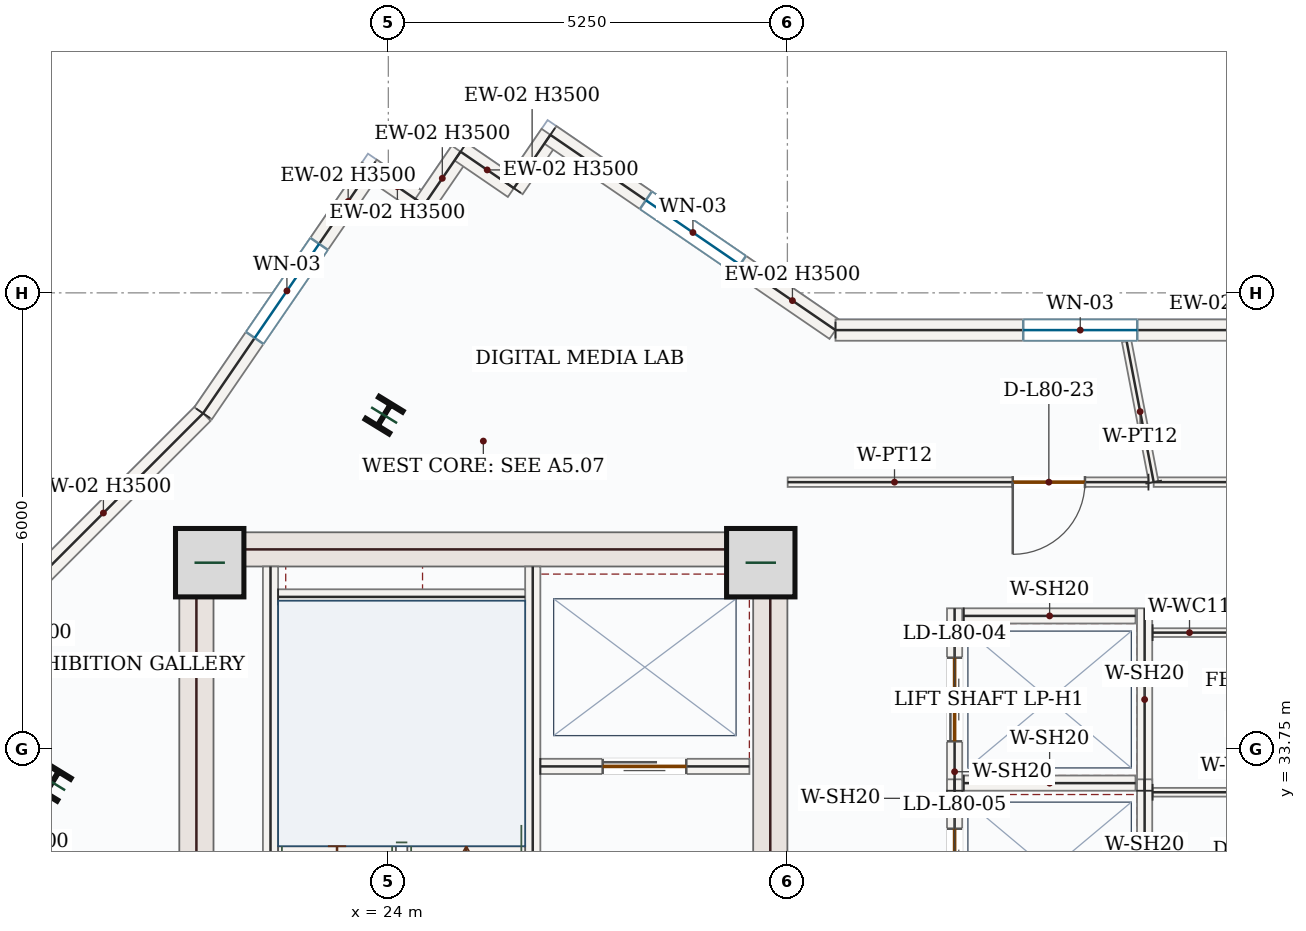
"""IFC4 building model, lengths in metres.
Left out: names, types, materials, properties, quantities, classifications, styles, units other than length and angle.
Written with IfcOpenShell. Run it as: python <this file> out.ifc"""

import sys

from ifc_helpers import new_model, si_unit, direction, frame, frame_2d, origin, origin_2d, place, context, subcontext, project, spatial, rectangle, i_section, extrude, source, transform, mapped, element, fill, save


model = new_model("IFC4")
c1 = context("Model", 3, precision=1e-05, world=origin(), true_north=direction((0.0, 1.0)))
c2 = subcontext(c1, "Body", "Model", "MODEL_VIEW")
j1 = project(units=[si_unit("LENGTHUNIT", "METRE"), si_unit("PLANEANGLEUNIT", "RADIAN")], contexts=[c1])
p1 = place(None, origin())
s1 = spatial("IfcSite", under=j1, at=p1, CompositionType="ELEMENT")
p2 = place(p1, origin())
s2 = spatial("IfcBuilding", under=s1, at=p2, CompositionType="ELEMENT")
p3 = place(p2, frame((0.0, 0.0, 331.05)))
s3 = spatial("IfcBuildingStorey", under=s2, at=p3, CompositionType="ELEMENT", Elevation=331.05)
m1 = source(origin(), c2, "Body", "SweptSolid", [
    extrude(rectangle(XDim=8.55, YDim=0.45, at=frame_2d((4.275, 0.0))), origin(), (0.0, 0.0, 1.0), 3.5),
])
p4 = place(p3, frame((21.475, 28.05, 0.0), z_axis=(0.0, 0.0, 1.0), x_axis=(0.0, 1.0, 0.0)))
e1 = element("IfcWall", 1, at=p4, inside=s3, PredefinedType="SHEAR", context=c2, shape_type="MappedRepresentation", body=[
    mapped(m1, transform((0.0, 0.0, 0.0), x_axis=(1.0, 0.0, 0.0), y_axis=(0.0, 1.0, 0.0), z_axis=(0.0, 0.0, 1.0), scale=1.0)),
])
p5 = place(p3, frame((29.025, 28.05, 0.0), z_axis=(0.0, 0.0, 1.0), x_axis=(0.0, 1.0, 0.0)))
e2 = element("IfcWall", 2, at=p5, inside=s3, PredefinedType="SHEAR", context=c2, shape_type="SweptSolid", body=[
    extrude(rectangle(XDim=8.55, YDim=0.45, at=frame_2d((4.275, 0.0))), origin(), (0.0, 0.0, 1.0), 3.5),
])
p6 = place(p5, frame((1.5, 0.0, 0.0)))
e3 = element("IfcOpeningElement", 3, at=p6, cuts=e2, PredefinedType="OPENING", context=c2, shape_type="SweptSolid", body=[
    extrude(rectangle(XDim=1.1, YDim=2.2, at=frame_2d((0.55, 1.1))), frame((0.0, 0.235, 0.0), z_axis=(0.0, -1.0, 0.0), x_axis=(1.0, 0.0, 0.0)), (0.0, 0.0, 1.0), 0.47),
])
m2 = source(origin(), c2, "Body", "SweptSolid", [
    extrude(rectangle(XDim=7.1, YDim=0.45, at=frame_2d((3.55, 0.0))), origin(), (0.0, 0.0, 1.0), 3.5),
])
p7 = place(p3, frame((21.7, 36.375, 0.0), z_axis=(0.0, 0.0, 1.0), x_axis=(1.0, 0.0, 0.0)))
e4 = element("IfcWall", 4, at=p7, inside=s3, PredefinedType="SHEAR", context=c2, shape_type="MappedRepresentation", body=[
    mapped(m2, transform((0.0, 0.0, 0.0), x_axis=(1.0, 0.0, 0.0), y_axis=(0.0, 1.0, 0.0), z_axis=(0.0, 0.0, 1.0), scale=1.0)),
])
m3 = source(origin(), c2, "Body", "SweptSolid", [
    extrude(rectangle(XDim=0.9, YDim=0.9, at=origin_2d()), origin(), (0.0, 0.0, 1.0), 3.75),
])
for number, where, z_axis, x_axis in (
    (5, (21.65, 36.2, 0.0), (0.0, 0.0, 1.0), (1.0, 0.0, 0.0)),
    (6, (28.9, 36.2, 0.0), (0.0, 0.0, 1.0), (1.0, 0.0, 0.0)),
):
    element("IfcColumn", number, at=place(p3, frame(where, z_axis=z_axis, x_axis=x_axis)), inside=s3, PredefinedType="COLUMN", context=c2, shape_type="MappedRepresentation", body=[
        mapped(m3, transform((0.0, 0.0, 0.0), x_axis=(1.0, 0.0, 0.0), y_axis=(0.0, 1.0, 0.0), z_axis=(0.0, 0.0, 1.0), scale=1.0)),
    ])
m4 = source(origin(), c2, "Body", "SweptSolid", [
    extrude(i_section(OverallWidth=0.369, OverallDepth=0.356, WebThickness=0.011, FlangeThickness=0.018, FilletRadius=0.018, at=origin_2d()), origin(), (0.0, 0.0, 1.0), 3.75),
])
for number, where, z_axis, x_axis in (
    (7, (23.945, 38.141, 0.0), (0.0, 0.0, 1.0), (-0.853, 0.522, 0.0)),
    (8, (19.577, 33.311, 0.0), (0.0, 0.0, 1.0), (-0.853, 0.522, 0.0)),
):
    element("IfcColumn", number, at=place(p3, frame(where, z_axis=z_axis, x_axis=x_axis)), inside=s3, PredefinedType="COLUMN", context=c2, shape_type="MappedRepresentation", body=[
        mapped(m4, transform((0.0, 0.0, 0.0), x_axis=(1.0, 0.0, 0.0), y_axis=(0.0, 1.0, 0.0), z_axis=(0.0, 0.0, 1.0), scale=1.0)),
    ])
m5 = source(origin(), c2, "Body", "SweptSolid", [
    extrude(rectangle(XDim=3.709, YDim=0.28, at=frame_2d((1.855, 0.0))), origin(), (0.0, 0.0, 1.0), 3.5),
])
p8 = place(p3, frame((18.94, 35.542, 0.0), z_axis=(0.0, 0.0, 1.0), x_axis=(0.707106781187, 0.707106781187, 0.0)))
e9 = element("IfcWall", 9, at=p8, inside=s3, PredefinedType="SOLIDWALL", context=c2, shape_type="MappedRepresentation", body=[
    mapped(m5, transform((0.0, 0.0, 0.0), x_axis=(1.0, 0.0, 0.0), y_axis=(0.0, 1.0, 0.0), z_axis=(0.0, 0.0, 1.0), scale=1.0)),
])
p9 = place(p3, frame((21.563, 38.165, 0.0), z_axis=(0.0, 0.0, 1.0), x_axis=(0.564961879511, 0.825117006672, 0.0)))
e10 = element("IfcWall", 10, at=p9, inside=s3, PredefinedType="SOLIDWALL", context=c2, shape_type="SweptSolid", body=[
    extrude(rectangle(XDim=3.904, YDim=0.28, at=frame_2d((1.952, 0.0))), origin(), (0.0, 0.0, 1.0), 3.5),
])
p10 = place(p9, frame((1.202, 0.0, 0.85)))
e11 = element("IfcOpeningElement", 11, at=p10, cuts=e10, PredefinedType="OPENING", context=c2, shape_type="SweptSolid", body=[
    extrude(rectangle(XDim=1.5, YDim=1.5, at=frame_2d((0.75, 0.75))), frame((0.0, 0.15, 0.0), z_axis=(0.0, -1.0, 0.0), x_axis=(1.0, 0.0, 0.0)), (0.0, 0.0, 1.0), 0.3),
])
m6 = source(origin(), c2, "Body", "SweptSolid", [
    extrude(rectangle(XDim=0.85, YDim=0.28, at=frame_2d((0.425, 0.0))), origin(), (0.0, 0.0, 1.0), 3.5),
])
for number, where, z_axis, x_axis in (
    (12, (23.769, 41.386, 0.0), (0.0, 0.0, 1.0), (0.825, -0.565, 0.0)),
    (13, (24.47, 40.906, 0.0), (0.0, 0.0, 1.0), (0.565, 0.825, 0.0)),
    (14, (24.95, 41.607, 0.0), (0.0, 0.0, 1.0), (0.825, -0.565, 0.0)),
    (15, (25.652, 41.127, 0.0), (0.0, 0.0, 1.0), (0.565, 0.825, 0.0)),
):
    element("IfcWall", number, at=place(p3, frame(where, z_axis=z_axis, x_axis=x_axis)), inside=s3, PredefinedType="SOLIDWALL", context=c2, shape_type="MappedRepresentation", body=[
        mapped(m6, transform((0.0, 0.0, 0.0), x_axis=(1.0, 0.0, 0.0), y_axis=(0.0, 1.0, 0.0), z_axis=(0.0, 0.0, 1.0), scale=1.0)),
    ])
p11 = place(p3, frame((26.132, 41.829, 0.0), z_axis=(0.0, 0.0, 1.0), x_axis=(0.825104362901, -0.564980345075, 0.0)))
e16 = element("IfcWall", 16, at=p11, inside=s3, PredefinedType="SOLIDWALL", context=c2, shape_type="SweptSolid", body=[
    extrude(rectangle(XDim=4.546, YDim=0.28, at=frame_2d((2.273, 0.0))), origin(), (0.0, 0.0, 1.0), 3.5),
])
p12 = place(p11, frame((1.523, 0.0, 0.85)))
e17 = element("IfcOpeningElement", 17, at=p12, cuts=e16, PredefinedType="OPENING", context=c2, shape_type="SweptSolid", body=[
    extrude(rectangle(XDim=1.5, YDim=1.5, at=frame_2d((0.75, 0.75))), frame((0.0, 0.15, 0.0), z_axis=(0.0, -1.0, 0.0), x_axis=(1.0, 0.0, 0.0)), (0.0, 0.0, 1.0), 0.3),
])
p13 = place(p3, frame((29.883, 39.26, 0.0), z_axis=(0.0, 0.0, 1.0), x_axis=(1.0, 0.0, 0.0)))
e18 = element("IfcWall", 18, at=p13, inside=s3, PredefinedType="SOLIDWALL", context=c2, shape_type="SweptSolid", body=[
    extrude(rectangle(XDim=6.44, YDim=0.28, at=frame_2d((3.22, 0.0))), origin(), (0.0, 0.0, 1.0), 3.5),
])
p14 = place(p13, frame((2.47, 0.0, 0.85)))
e19 = element("IfcOpeningElement", 19, at=p14, cuts=e18, PredefinedType="OPENING", context=c2, shape_type="SweptSolid", body=[
    extrude(rectangle(XDim=1.5, YDim=1.5, at=frame_2d((0.75, 0.75))), frame((0.0, 0.15, 0.0), z_axis=(0.0, -1.0, 0.0), x_axis=(1.0, 0.0, 0.0)), (0.0, 0.0, 1.0), 0.3),
])
m7 = source(origin(), c2, "Body", "SweptSolid", [
    extrude(rectangle(XDim=7.87, YDim=0.2, at=frame_2d((3.935, 0.0))), origin(), (0.0, 0.0, 1.0), 3.5),
])
p15 = place(p3, frame((22.45, 28.28, 0.0), z_axis=(0.0, 0.0, 1.0), x_axis=(0.0, 1.0, 0.0)))
e20 = element("IfcWall", 20, at=p15, inside=s3, PredefinedType="SOLIDWALL", context=c2, shape_type="MappedRepresentation", body=[
    mapped(m7, transform((0.0, 0.0, 0.0), x_axis=(1.0, 0.0, 0.0), y_axis=(0.0, 1.0, 0.0), z_axis=(0.0, 0.0, 1.0), scale=1.0)),
])
p16 = place(p3, frame((25.9, 28.15, 0.0), z_axis=(0.0, 0.0, 1.0), x_axis=(0.0, 1.0, 0.0)))
e21 = element("IfcWall", 21, at=p16, inside=s3, PredefinedType="SOLIDWALL", context=c2, shape_type="SweptSolid", body=[
    extrude(rectangle(XDim=8.0, YDim=0.2, at=frame_2d((4.0, 0.0))), origin(), (0.0, 0.0, 1.0), 3.5),
])
p17 = place(p16, frame((0.4, 0.0, 0.0)))
e22 = element("IfcOpeningElement", 22, at=p17, cuts=e21, PredefinedType="OPENING", context=c2, shape_type="SweptSolid", body=[
    extrude(rectangle(XDim=1.05, YDim=2.15, at=frame_2d((0.525, 1.075))), frame((0.0, 0.11, 0.0), z_axis=(0.0, -1.0, 0.0), x_axis=(1.0, 0.0, 0.0)), (0.0, 0.0, 1.0), 0.22),
])
m8 = source(origin(), c2, "Body", "SweptSolid", [
    extrude(rectangle(XDim=3.25, YDim=0.2, at=frame_2d((1.625, 0.0))), origin(), (0.0, 0.0, 1.0), 3.5),
])
p18 = place(p3, frame((22.55, 35.75, 0.0), z_axis=(0.0, 0.0, 1.0), x_axis=(1.0, 0.0, 0.0)))
e23 = element("IfcWall", 23, at=p18, inside=s3, PredefinedType="SOLIDWALL", context=c2, shape_type="MappedRepresentation", body=[
    mapped(m8, transform((0.0, 0.0, 0.0), x_axis=(1.0, 0.0, 0.0), y_axis=(0.0, 1.0, 0.0), z_axis=(0.0, 0.0, 1.0), scale=1.0)),
])
p19 = place(p3, frame((26.0, 33.52, 0.0), z_axis=(0.0, 0.0, 1.0), x_axis=(1.0, 0.0, 0.0)))
e24 = element("IfcWall", 24, at=p19, inside=s3, PredefinedType="SOLIDWALL", context=c2, shape_type="SweptSolid", body=[
    extrude(rectangle(XDim=2.75, YDim=0.2, at=frame_2d((1.375, 0.0))), origin(), (0.0, 0.0, 1.0), 3.5),
])
p20 = place(p19, frame((0.82, 0.0, 0.0)))
e25 = element("IfcOpeningElement", 25, at=p20, cuts=e24, PredefinedType="OPENING", context=c2, shape_type="SweptSolid", body=[
    extrude(rectangle(XDim=1.1, YDim=2.15, at=frame_2d((0.55, 1.075))), frame((0.0, 0.11, 0.0), z_axis=(0.0, -1.0, 0.0), x_axis=(1.0, 0.0, 0.0)), (0.0, 0.0, 1.0), 0.22),
])
p21 = place(p3, frame((31.45, 33.2, 0.0), z_axis=(0.0, 0.0, 1.0), x_axis=(0.0, 1.0, 0.0)))
e26 = element("IfcWall", 26, at=p21, inside=s3, PredefinedType="SOLIDWALL", context=c2, shape_type="SweptSolid", body=[
    extrude(rectangle(XDim=2.4, YDim=0.2, at=frame_2d((1.2, 0.0))), origin(), (0.0, 0.0, 1.0), 3.5),
])
p22 = place(p21, frame((0.65, 0.0, 0.0)))
e27 = element("IfcOpeningElement", 27, at=p22, cuts=e26, PredefinedType="OPENING", context=c2, shape_type="SweptSolid", body=[
    extrude(rectangle(XDim=1.1, YDim=2.15, at=frame_2d((0.55, 1.075))), frame((0.0, 0.11, 0.0), z_axis=(0.0, -1.0, 0.0), x_axis=(1.0, 0.0, 0.0)), (0.0, 0.0, 1.0), 0.22),
])
m9 = source(origin(), c2, "Body", "SweptSolid", [
    extrude(rectangle(XDim=2.4, YDim=0.2, at=frame_2d((1.2, 0.0))), origin(), (0.0, 0.0, 1.0), 3.5),
])
p23 = place(p3, frame((33.95, 33.2, 0.0), z_axis=(0.0, 0.0, 1.0), x_axis=(0.0, 1.0, 0.0)))
e28 = element("IfcWall", 28, at=p23, inside=s3, PredefinedType="SOLIDWALL", context=c2, shape_type="MappedRepresentation", body=[
    mapped(m9, transform((0.0, 0.0, 0.0), x_axis=(1.0, 0.0, 0.0), y_axis=(0.0, 1.0, 0.0), z_axis=(0.0, 0.0, 1.0), scale=1.0)),
])
m10 = source(origin(), c2, "Body", "SweptSolid", [
    extrude(rectangle(XDim=2.26, YDim=0.2, at=frame_2d((1.13, 0.0))), origin(), (0.0, 0.0, 1.0), 3.5),
])
for number, where, z_axis, x_axis in (
    (29, (31.57, 33.3, 0.0), (0.0, 0.0, 1.0), (1.0, 0.0, 0.0)),
    (30, (31.57, 35.5, 0.0), (0.0, 0.0, 1.0), (1.0, 0.0, 0.0)),
):
    element("IfcWall", number, at=place(p3, frame(where, z_axis=z_axis, x_axis=x_axis)), inside=s3, PredefinedType="SOLIDWALL", context=c2, shape_type="MappedRepresentation", body=[
        mapped(m10, transform((0.0, 0.0, 0.0), x_axis=(1.0, 0.0, 0.0), y_axis=(0.0, 1.0, 0.0), z_axis=(0.0, 0.0, 1.0), scale=1.0)),
    ])
p24 = place(p3, frame((31.45, 30.95, 0.0), z_axis=(0.0, 0.0, 1.0), x_axis=(0.0, 1.0, 0.0)))
e31 = element("IfcWall", 31, at=p24, inside=s3, PredefinedType="SOLIDWALL", context=c2, shape_type="SweptSolid", body=[
    extrude(rectangle(XDim=2.4, YDim=0.2, at=frame_2d((1.2, 0.0))), origin(), (0.0, 0.0, 1.0), 3.5),
])
p25 = place(p24, frame((0.65, 0.0, 0.0)))
e32 = element("IfcOpeningElement", 32, at=p25, cuts=e31, PredefinedType="OPENING", context=c2, shape_type="SweptSolid", body=[
    extrude(rectangle(XDim=1.1, YDim=2.15, at=frame_2d((0.55, 1.075))), frame((0.0, 0.11, 0.0), z_axis=(0.0, -1.0, 0.0), x_axis=(1.0, 0.0, 0.0)), (0.0, 0.0, 1.0), 0.22),
])
p26 = place(p3, frame((33.95, 30.95, 0.0), z_axis=(0.0, 0.0, 1.0), x_axis=(0.0, 1.0, 0.0)))
e33 = element("IfcWall", 33, at=p26, inside=s3, PredefinedType="SOLIDWALL", context=c2, shape_type="MappedRepresentation", body=[
    mapped(m9, transform((0.0, 0.0, 0.0), x_axis=(1.0, 0.0, 0.0), y_axis=(0.0, 1.0, 0.0), z_axis=(0.0, 0.0, 1.0), scale=1.0)),
])
m11 = source(origin(), c2, "Body", "SweptSolid", [
    extrude(rectangle(XDim=2.355, YDim=0.115, at=frame_2d((1.177, 0.0))), origin(), (0.0, 0.0, 1.0), 3.5),
])
p27 = place(p3, frame((34.055, 33.18, 0.0), z_axis=(0.0, 0.0, 1.0), x_axis=(1.0, 0.0, 0.0)))
e34 = element("IfcWall", 34, at=p27, inside=s3, PredefinedType="PARTITIONING", context=c2, shape_type="MappedRepresentation", body=[
    mapped(m11, transform((0.0, 0.0, 0.0), x_axis=(1.0, 0.0, 0.0), y_axis=(0.0, 1.0, 0.0), z_axis=(0.0, 0.0, 1.0), scale=1.0)),
])
p28 = place(p3, frame((34.055, 35.28, 0.0), z_axis=(0.0, 0.0, 1.0), x_axis=(1.0, 0.0, 0.0)))
e35 = element("IfcWall", 35, at=p28, inside=s3, PredefinedType="PARTITIONING", context=c2, shape_type="SweptSolid", body=[
    extrude(rectangle(XDim=2.355, YDim=0.115, at=frame_2d((1.177, 0.0))), origin(), (0.0, 0.0, 1.0), 3.5),
])
p29 = place(p28, frame((1.121, 0.0, 0.0)))
e36 = element("IfcOpeningElement", 36, at=p29, cuts=e35, PredefinedType="OPENING", context=c2, shape_type="SweptSolid", body=[
    extrude(rectangle(XDim=0.9, YDim=2.1, at=frame_2d((0.45, 1.05))), frame((0.0, 0.067, 0.0), z_axis=(0.0, -1.0, 0.0), x_axis=(1.0, 0.0, 0.0)), (0.0, 0.0, 1.0), 0.135),
])
p30 = place(p3, frame((39.765, 37.26, 0.0), z_axis=(0.0, 0.0, 1.0), x_axis=(-1.0, 0.0, 0.0)))
e37 = element("IfcWall", 37, at=p30, inside=s3, PredefinedType="PARTITIONING", context=c2, shape_type="SweptSolid", body=[
    extrude(rectangle(XDim=5.696, YDim=0.125, at=frame_2d((2.848, 0.0))), origin(), (0.0, 0.0, 1.0), 3.5),
])
p31 = place(p30, frame((3.085, 0.0, 0.0)))
e38 = element("IfcOpeningElement", 38, at=p31, cuts=e37, PredefinedType="OPENING", context=c2, shape_type="SweptSolid", body=[
    extrude(rectangle(XDim=0.95, YDim=2.15, at=frame_2d((0.475, 1.075))), frame((0.0, 0.073, 0.0), z_axis=(0.0, -1.0, 0.0), x_axis=(1.0, 0.0, 0.0)), (0.0, 0.0, 1.0), 0.145),
])
m12 = source(origin(), c2, "Body", "SweptSolid", [
    extrude(rectangle(XDim=1.889, YDim=0.125, at=frame_2d((0.944, 0.0))), origin(), (0.0, 0.0, 1.0), 3.5),
])
p32 = place(p3, frame((34.069, 37.26, 0.0), z_axis=(0.0, 0.0, 1.0), x_axis=(-0.188454265316, 0.982081966989, 0.0)))
e39 = element("IfcWall", 39, at=p32, inside=s3, PredefinedType="PARTITIONING", context=c2, shape_type="MappedRepresentation", body=[
    mapped(m12, transform((0.0, 0.0, 0.0), x_axis=(1.0, 0.0, 0.0), y_axis=(0.0, 1.0, 0.0), z_axis=(0.0, 0.0, 1.0), scale=1.0)),
])
p33 = place(p3, frame((34.0, 37.26, 0.0), z_axis=(0.0, 0.0, 1.0), x_axis=(-0.999999994709, -0.000102870075, 0.0)))
e40 = element("IfcWall", 40, at=p33, inside=s3, PredefinedType="PARTITIONING", context=c2, shape_type="SweptSolid", body=[
    extrude(rectangle(XDim=4.747, YDim=0.125, at=frame_2d((2.373, 0.0))), origin(), (0.0, 0.0, 1.0), 3.5),
])
p34 = place(p33, frame((0.835, 0.0, 0.0)))
e41 = element("IfcOpeningElement", 41, at=p34, cuts=e40, PredefinedType="OPENING", context=c2, shape_type="SweptSolid", body=[
    extrude(rectangle(XDim=0.95, YDim=2.15, at=frame_2d((0.475, 1.075))), frame((0.0, 0.073, 0.0), z_axis=(0.0, -1.0, 0.0), x_axis=(1.0, 0.0, 0.0)), (0.0, 0.0, 1.0), 0.145),
])
m13 = source(origin(), c2, "Body", "SweptSolid", [
    extrude(rectangle(XDim=1.5, YDim=1.5, at=frame_2d((0.75, 0.75))), frame((0.0, 0.03, 0.0), z_axis=(0.0, -1.0, 0.0), x_axis=(1.0, 0.0, 0.0)), (0.0, 0.0, 1.0), 0.06),
])
p35 = place(p10, origin())
e42 = element("IfcWindow", 42, at=p35, inside=s3, PartitioningType="SINGLE_PANEL", PredefinedType="WINDOW", context=c2, shape_type="MappedRepresentation", body=[
    mapped(m13, transform((0.0, 0.0, 0.0), x_axis=(1.0, 0.0, 0.0), y_axis=(0.0, 1.0, 0.0), z_axis=(0.0, 0.0, 1.0), scale=1.0)),
])
fill(e11, e42)
p36 = place(p12, origin())
e43 = element("IfcWindow", 43, at=p36, inside=s3, PartitioningType="SINGLE_PANEL", PredefinedType="WINDOW", context=c2, shape_type="MappedRepresentation", body=[
    mapped(m13, transform((0.0, 0.0, 0.0), x_axis=(1.0, 0.0, 0.0), y_axis=(0.0, 1.0, 0.0), z_axis=(0.0, 0.0, 1.0), scale=1.0)),
])
fill(e17, e43)
p37 = place(p14, origin())
e44 = element("IfcWindow", 44, at=p37, inside=s3, PartitioningType="SINGLE_PANEL", PredefinedType="WINDOW", context=c2, shape_type="MappedRepresentation", body=[
    mapped(m13, transform((0.0, 0.0, 0.0), x_axis=(1.0, 0.0, 0.0), y_axis=(0.0, 1.0, 0.0), z_axis=(0.0, 0.0, 1.0), scale=1.0)),
])
fill(e19, e44)
m14 = source(origin(), c2, "Body", "SweptSolid", [
    extrude(rectangle(XDim=1.1, YDim=2.15, at=frame_2d((0.55, 1.075))), frame((0.0, 0.025, 0.0), z_axis=(0.0, -1.0, 0.0), x_axis=(1.0, 0.0, 0.0)), (0.0, 0.0, 1.0), 0.05),
])
p38 = place(p20, origin())
e45 = element("IfcDoor", 45, at=p38, inside=s3, OperationType="DOUBLE_DOOR_SLIDING", PredefinedType="DOOR", context=c2, shape_type="MappedRepresentation", body=[
    mapped(m14, transform((0.0, 0.0, 0.0), x_axis=(1.0, 0.0, 0.0), y_axis=(0.0, 1.0, 0.0), z_axis=(0.0, 0.0, 1.0), scale=1.0)),
])
fill(e25, e45)
p39 = place(p22, origin())
e46 = element("IfcDoor", 46, at=p39, inside=s3, OperationType="DOUBLE_DOOR_SLIDING", PredefinedType="DOOR", context=c2, shape_type="MappedRepresentation", body=[
    mapped(m14, transform((0.0, 0.0, 0.0), x_axis=(1.0, 0.0, 0.0), y_axis=(0.0, 1.0, 0.0), z_axis=(0.0, 0.0, 1.0), scale=1.0)),
])
fill(e27, e46)
p40 = place(p25, origin())
e47 = element("IfcDoor", 47, at=p40, inside=s3, OperationType="DOUBLE_DOOR_SLIDING", PredefinedType="DOOR", context=c2, shape_type="MappedRepresentation", body=[
    mapped(m14, transform((0.0, 0.0, 0.0), x_axis=(1.0, 0.0, 0.0), y_axis=(0.0, 1.0, 0.0), z_axis=(0.0, 0.0, 1.0), scale=1.0)),
])
fill(e32, e47)
m15 = source(origin(), c2, "Body", "SweptSolid", [
    extrude(rectangle(XDim=0.95, YDim=2.15, at=frame_2d((0.475, 1.075))), frame((0.0, 0.025, 0.0), z_axis=(0.0, -1.0, 0.0), x_axis=(1.0, 0.0, 0.0)), (0.0, 0.0, 1.0), 0.05),
])
p41 = place(p34, origin())
e48 = element("IfcDoor", 48, at=p41, inside=s3, OperationType="SINGLE_SWING_RIGHT", PredefinedType="DOOR", context=c2, shape_type="MappedRepresentation", body=[
    mapped(m15, transform((0.0, 0.0, 0.0), x_axis=(1.0, 0.0, 0.0), y_axis=(0.0, 1.0, 0.0), z_axis=(0.0, 0.0, 1.0), scale=1.0)),
])
fill(e41, e48)
save(model, sys.argv[1])
